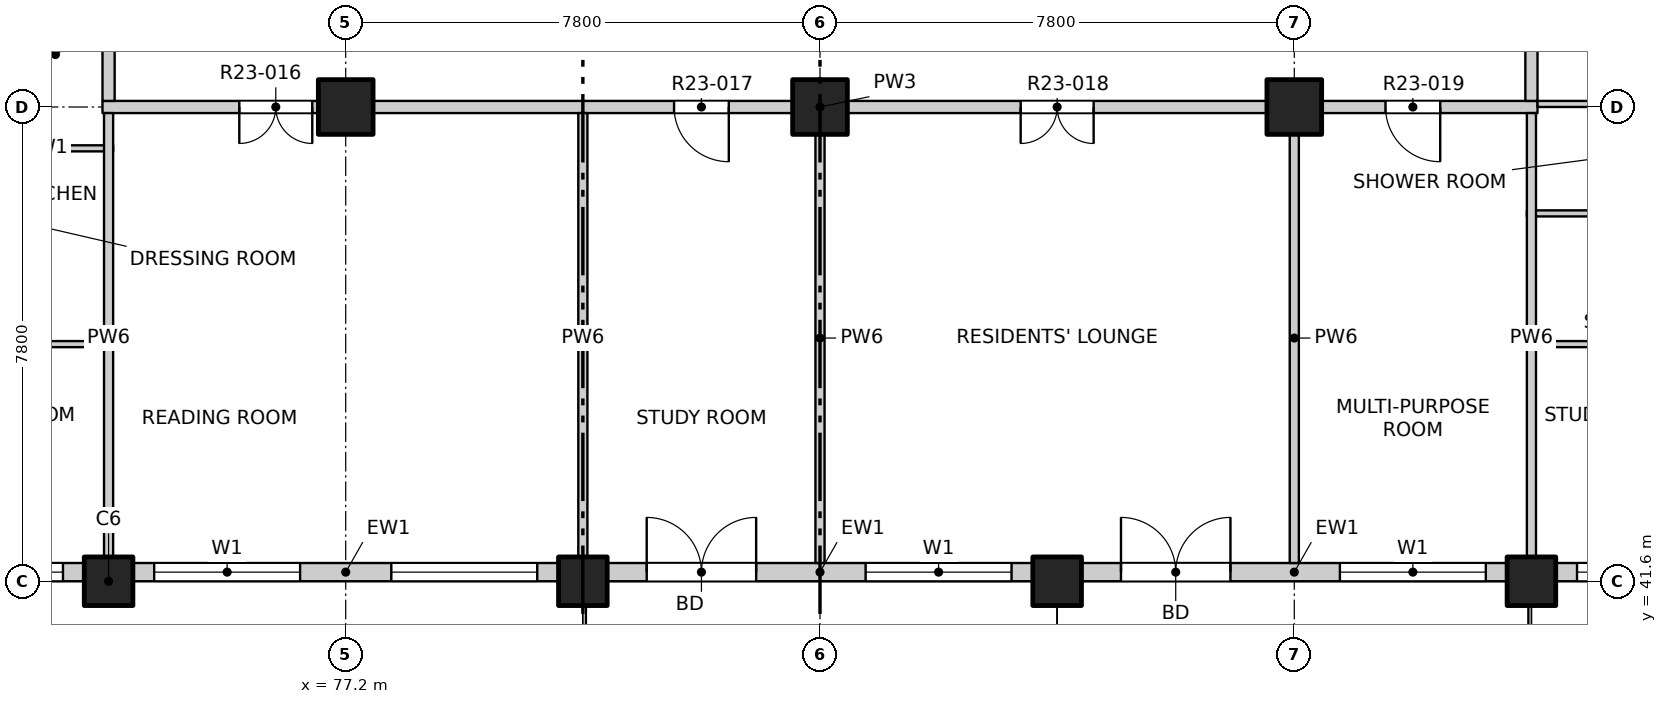
"""IFC4 building model, lengths in metres.
Left out: names, types, materials, properties, quantities, classifications, styles, units other than length and angle.
Written with IfcOpenShell. Run it as: python <this file> out.ifc"""

import sys

from ifc_helpers import new_model, si_unit, direction, frame, frame_2d, origin, origin_2d, place, context, subcontext, project, spatial, rectangle, extrude, element, fill, save


model = new_model("IFC4")
c1 = context("Model", 3, precision=1e-05, world=origin(), true_north=direction((0.0, 1.0)))
c2 = subcontext(c1, "Body", "Model", "MODEL_VIEW")
j1 = project(units=[si_unit("LENGTHUNIT", "METRE"), si_unit("PLANEANGLEUNIT", "RADIAN")], contexts=[c1])
p1 = place(None, origin())
s1 = spatial("IfcSite", under=j1, at=p1, CompositionType="ELEMENT")
p2 = place(p1, origin())
s2 = spatial("IfcBuilding", under=s1, at=p2, CompositionType="ELEMENT")
p3 = place(p2, frame((0.0, 0.0, 238.1)))
s3 = spatial("IfcBuildingStorey", under=s2, at=p3, CompositionType="ELEMENT", Elevation=238.1)
for number, where, z_axis, x_axis in (
    (1, (73.3, 41.6, -0.25), (0.0, 0.0, 1.0), (1.0, 0.0, 0.0)),
    (2, (81.1, 41.6, -0.25), (0.0, 0.0, 1.0), (1.0, 0.0, 0.0)),
    (3, (88.9, 41.6, -0.25), (0.0, 0.0, 1.0), (1.0, 0.0, 0.0)),
    (4, (96.7, 41.6, -0.25), (0.0, 0.0, 1.0), (1.0, 0.0, 0.0)),
):
    element("IfcColumn", number, at=place(p3, frame(where, z_axis=z_axis, x_axis=x_axis)), inside=s3, PredefinedType="COLUMN", context=c2, shape_type="SweptSolid", body=[
        extrude(rectangle(XDim=0.8, YDim=0.8, at=origin_2d()), origin(), (0.0, 0.0, 1.0), 3.35),
    ])
for number, where, z_axis, x_axis in (
    (5, (77.2, 49.4, -0.25), (0.0, 0.0, 1.0), (1.0, 0.0, 0.0)),
    (6, (85.0, 49.4, -0.25), (0.0, 0.0, 1.0), (1.0, 0.0, 0.0)),
    (7, (92.8, 49.4, -0.25), (0.0, 0.0, 1.0), (1.0, 0.0, 0.0)),
):
    element("IfcColumn", number, at=place(p3, frame(where, z_axis=z_axis, x_axis=x_axis)), inside=s3, PredefinedType="COLUMN", context=c2, shape_type="SweptSolid", body=[
        extrude(rectangle(XDim=0.9, YDim=0.9, at=origin_2d()), origin(), (0.0, 0.0, 1.0), 3.35),
    ])
p4 = place(p3, frame((65.5, 41.75, 0.0), z_axis=(0.0, 0.0, 1.0), x_axis=(1.0, 0.0, 0.0)))
e8 = element("IfcWall", 8, at=p4, inside=s3, PredefinedType="SOLIDWALL", context=c2, shape_type="SweptSolid", body=[
    extrude(rectangle(XDim=7.4, YDim=0.3, at=frame_2d((3.7, 0.0))), origin(), (0.0, 0.0, 1.0), 3.1),
])
p5 = place(p4, frame((0.75, 0.0, 0.9)))
e9 = element("IfcOpeningElement", 9, at=p5, cuts=e8, PredefinedType="OPENING", context=c2, shape_type="SweptSolid", body=[
    extrude(rectangle(XDim=2.4, YDim=1.8, at=frame_2d((1.2, 0.9))), frame((0.0, 0.16, 0.0), z_axis=(0.0, -1.0, 0.0), x_axis=(1.0, 0.0, 0.0)), (0.0, 0.0, 1.0), 0.32),
])
p6 = place(p4, frame((4.65, 0.0, 0.9)))
e10 = element("IfcOpeningElement", 10, at=p6, cuts=e8, PredefinedType="OPENING", context=c2, shape_type="SweptSolid", body=[
    extrude(rectangle(XDim=2.4, YDim=1.8, at=frame_2d((1.2, 0.9))), frame((0.0, 0.16, 0.0), z_axis=(0.0, -1.0, 0.0), x_axis=(1.0, 0.0, 0.0)), (0.0, 0.0, 1.0), 0.32),
])
p7 = place(p3, frame((73.7, 41.75, 0.0), z_axis=(0.0, 0.0, 1.0), x_axis=(1.0, 0.0, 0.0)))
e11 = element("IfcWall", 11, at=p7, inside=s3, PredefinedType="SOLIDWALL", context=c2, shape_type="SweptSolid", body=[
    extrude(rectangle(XDim=7.0, YDim=0.3, at=frame_2d((3.5, 0.0))), origin(), (0.0, 0.0, 1.0), 3.1),
])
p8 = place(p7, frame((0.35, 0.0, 0.9)))
e12 = element("IfcOpeningElement", 12, at=p8, cuts=e11, PredefinedType="OPENING", context=c2, shape_type="SweptSolid", body=[
    extrude(rectangle(XDim=2.4, YDim=1.8, at=frame_2d((1.2, 0.9))), frame((0.0, 0.16, 0.0), z_axis=(0.0, -1.0, 0.0), x_axis=(1.0, 0.0, 0.0)), (0.0, 0.0, 1.0), 0.32),
])
p9 = place(p7, frame((4.25, 0.0, 0.9)))
e13 = element("IfcOpeningElement", 13, at=p9, cuts=e11, PredefinedType="OPENING", context=c2, shape_type="SweptSolid", body=[
    extrude(rectangle(XDim=2.4, YDim=1.8, at=frame_2d((1.2, 0.9))), frame((0.0, 0.16, 0.0), z_axis=(0.0, -1.0, 0.0), x_axis=(1.0, 0.0, 0.0)), (0.0, 0.0, 1.0), 0.32),
])
p10 = place(p3, frame((81.5, 41.75, 0.0), z_axis=(0.0, 0.0, 1.0), x_axis=(1.0, 0.0, 0.0)))
e14 = element("IfcWall", 14, at=p10, inside=s3, PredefinedType="SOLIDWALL", context=c2, shape_type="SweptSolid", body=[
    extrude(rectangle(XDim=7.0, YDim=0.3, at=frame_2d((3.5, 0.0))), origin(), (0.0, 0.0, 1.0), 3.1),
])
p11 = place(p10, frame((0.65, 0.0, 0.0)))
e15 = element("IfcOpeningElement", 15, at=p11, cuts=e14, PredefinedType="OPENING", context=c2, shape_type="SweptSolid", body=[
    extrude(rectangle(XDim=1.8, YDim=2.4, at=frame_2d((0.9, 1.2))), frame((0.0, 0.16, 0.0), z_axis=(0.0, -1.0, 0.0), x_axis=(1.0, 0.0, 0.0)), (0.0, 0.0, 1.0), 0.32),
])
p12 = place(p10, frame((4.25, 0.0, 0.9)))
e16 = element("IfcOpeningElement", 16, at=p12, cuts=e14, PredefinedType="OPENING", context=c2, shape_type="SweptSolid", body=[
    extrude(rectangle(XDim=2.4, YDim=1.8, at=frame_2d((1.2, 0.9))), frame((0.0, 0.16, 0.0), z_axis=(0.0, -1.0, 0.0), x_axis=(1.0, 0.0, 0.0)), (0.0, 0.0, 1.0), 0.32),
])
p13 = place(p3, frame((89.3, 41.75, 0.0), z_axis=(0.0, 0.0, 1.0), x_axis=(1.0, 0.0, 0.0)))
e17 = element("IfcWall", 17, at=p13, inside=s3, PredefinedType="SOLIDWALL", context=c2, shape_type="SweptSolid", body=[
    extrude(rectangle(XDim=7.0, YDim=0.3, at=frame_2d((3.5, 0.0))), origin(), (0.0, 0.0, 1.0), 3.1),
])
p14 = place(p13, frame((0.65, 0.0, 0.0)))
e18 = element("IfcOpeningElement", 18, at=p14, cuts=e17, PredefinedType="OPENING", context=c2, shape_type="SweptSolid", body=[
    extrude(rectangle(XDim=1.8, YDim=2.4, at=frame_2d((0.9, 1.2))), frame((0.0, 0.16, 0.0), z_axis=(0.0, -1.0, 0.0), x_axis=(1.0, 0.0, 0.0)), (0.0, 0.0, 1.0), 0.32),
])
p15 = place(p13, frame((4.25, 0.0, 0.9)))
e19 = element("IfcOpeningElement", 19, at=p15, cuts=e17, PredefinedType="OPENING", context=c2, shape_type="SweptSolid", body=[
    extrude(rectangle(XDim=2.4, YDim=1.8, at=frame_2d((1.2, 0.9))), frame((0.0, 0.16, 0.0), z_axis=(0.0, -1.0, 0.0), x_axis=(1.0, 0.0, 0.0)), (0.0, 0.0, 1.0), 0.32),
])
p16 = place(p3, frame((97.1, 41.75, 0.0), z_axis=(0.0, 0.0, 1.0), x_axis=(1.0, 0.0, 0.0)))
e20 = element("IfcWall", 20, at=p16, inside=s3, PredefinedType="SOLIDWALL", context=c2, shape_type="SweptSolid", body=[
    extrude(rectangle(XDim=7.4, YDim=0.3, at=frame_2d((3.7, 0.0))), origin(), (0.0, 0.0, 1.0), 3.1),
])
p17 = place(p16, frame((0.35, 0.0, 0.9)))
e21 = element("IfcOpeningElement", 21, at=p17, cuts=e20, PredefinedType="OPENING", context=c2, shape_type="SweptSolid", body=[
    extrude(rectangle(XDim=2.4, YDim=1.8, at=frame_2d((1.2, 0.9))), frame((0.0, 0.16, 0.0), z_axis=(0.0, -1.0, 0.0), x_axis=(1.0, 0.0, 0.0)), (0.0, 0.0, 1.0), 0.32),
])
p18 = place(p16, frame((4.25, 0.0, 0.9)))
e22 = element("IfcOpeningElement", 22, at=p18, cuts=e20, PredefinedType="OPENING", context=c2, shape_type="SweptSolid", body=[
    extrude(rectangle(XDim=2.4, YDim=1.8, at=frame_2d((1.2, 0.9))), frame((0.0, 0.16, 0.0), z_axis=(0.0, -1.0, 0.0), x_axis=(1.0, 0.0, 0.0)), (0.0, 0.0, 1.0), 0.32),
])
p19 = place(p3, frame((61.9, 45.5, 0.0), z_axis=(0.0, 0.0, 1.0), x_axis=(1.0, 0.0, 0.0)))
e23 = element("IfcWall", 23, at=p19, inside=s3, PredefinedType="PARTITIONING", context=c2, shape_type="SweptSolid", body=[
    extrude(rectangle(XDim=11.475, YDim=0.1, at=frame_2d((5.737, 0.0))), origin(), (0.0, 0.0, 1.0), 3.1),
])
p20 = place(p19, frame((7.965, 0.0, 0.0)))
e24 = element("IfcOpeningElement", 24, at=p20, cuts=e23, PredefinedType="OPENING", context=c2, shape_type="SweptSolid", body=[
    extrude(rectangle(XDim=0.9, YDim=2.1, at=frame_2d((0.45, 1.05))), frame((0.0, 0.06, 0.0), z_axis=(0.0, -1.0, 0.0), x_axis=(1.0, 0.0, 0.0)), (0.0, 0.0, 1.0), 0.12),
])
p21 = place(p3, frame((96.625, 45.5, 0.0), z_axis=(0.0, 0.0, 1.0), x_axis=(1.0, 0.0, 0.0)))
e25 = element("IfcWall", 25, at=p21, inside=s3, PredefinedType="PARTITIONING", context=c2, shape_type="SweptSolid", body=[
    extrude(rectangle(XDim=11.475, YDim=0.1, at=frame_2d((5.738, 0.0))), origin(), (0.0, 0.0, 1.0), 3.1),
])
p22 = place(p21, frame((2.61, 0.0, 0.0)))
e26 = element("IfcOpeningElement", 26, at=p22, cuts=e25, PredefinedType="OPENING", context=c2, shape_type="SweptSolid", body=[
    extrude(rectangle(XDim=0.9, YDim=2.1, at=frame_2d((0.45, 1.05))), frame((0.0, 0.06, 0.0), z_axis=(0.0, -1.0, 0.0), x_axis=(1.0, 0.0, 0.0)), (0.0, 0.0, 1.0), 0.12),
])
p23 = place(p3, frame((96.625, 47.65, 0.0), z_axis=(0.0, 0.0, 1.0), x_axis=(1.0, 0.0, 0.0)))
e27 = element("IfcWall", 27, at=p23, inside=s3, PredefinedType="PARTITIONING", context=c2, shape_type="SweptSolid", body=[
    extrude(rectangle(XDim=2.195, YDim=0.1, at=frame_2d((1.098, 0.0))), origin(), (0.0, 0.0, 1.0), 3.1),
])
p24 = place(p3, frame((71.18, 48.72, 0.0), z_axis=(0.0, 0.0, 1.0), x_axis=(1.0, 0.0, 0.0)))
e28 = element("IfcWall", 28, at=p24, inside=s3, PredefinedType="PARTITIONING", context=c2, shape_type="SweptSolid", body=[
    extrude(rectangle(XDim=2.195, YDim=0.1, at=frame_2d((1.097, 0.0))), origin(), (0.0, 0.0, 1.0), 3.1),
])
p25 = place(p3, frame((73.2, 49.4, 0.0), z_axis=(0.0, 0.0, 1.0), x_axis=(1.0, 0.0, 0.0)))
e29 = element("IfcWall", 29, at=p25, inside=s3, PredefinedType="PARTITIONING", context=c2, shape_type="SweptSolid", body=[
    extrude(rectangle(XDim=23.6, YDim=0.2, at=frame_2d((11.8, 0.0))), origin(), (0.0, 0.0, 1.0), 3.1),
])
p26 = place(p25, frame((2.25, 0.0, 0.0)))
e30 = element("IfcOpeningElement", 30, at=p26, cuts=e29, PredefinedType="OPENING", context=c2, shape_type="SweptSolid", body=[
    extrude(rectangle(XDim=1.2, YDim=2.1, at=frame_2d((0.6, 1.05))), frame((0.0, 0.11, 0.0), z_axis=(0.0, -1.0, 0.0), x_axis=(1.0, 0.0, 0.0)), (0.0, 0.0, 1.0), 0.22),
])
p27 = place(p25, frame((9.4, 0.0, 0.0)))
e31 = element("IfcOpeningElement", 31, at=p27, cuts=e29, PredefinedType="OPENING", context=c2, shape_type="SweptSolid", body=[
    extrude(rectangle(XDim=0.9, YDim=2.1, at=frame_2d((0.45, 1.05))), frame((0.0, 0.11, 0.0), z_axis=(0.0, -1.0, 0.0), x_axis=(1.0, 0.0, 0.0)), (0.0, 0.0, 1.0), 0.22),
])
p28 = place(p25, frame((15.1, 0.0, 0.0)))
e32 = element("IfcOpeningElement", 32, at=p28, cuts=e29, PredefinedType="OPENING", context=c2, shape_type="SweptSolid", body=[
    extrude(rectangle(XDim=1.2, YDim=2.1, at=frame_2d((0.6, 1.05))), frame((0.0, 0.11, 0.0), z_axis=(0.0, -1.0, 0.0), x_axis=(1.0, 0.0, 0.0)), (0.0, 0.0, 1.0), 0.22),
])
p29 = place(p25, frame((21.1, 0.0, 0.0)))
e33 = element("IfcOpeningElement", 33, at=p29, cuts=e29, PredefinedType="OPENING", context=c2, shape_type="SweptSolid", body=[
    extrude(rectangle(XDim=0.9, YDim=2.1, at=frame_2d((0.45, 1.05))), frame((0.0, 0.11, 0.0), z_axis=(0.0, -1.0, 0.0), x_axis=(1.0, 0.0, 0.0)), (0.0, 0.0, 1.0), 0.22),
])
p30 = place(p3, frame((96.8, 49.45, 0.0), z_axis=(0.0, 0.0, 1.0), x_axis=(1.0, 0.0, 0.0)))
e34 = element("IfcWall", 34, at=p30, inside=s3, PredefinedType="PARTITIONING", context=c2, shape_type="SweptSolid", body=[
    extrude(rectangle(XDim=2.02, YDim=0.1, at=frame_2d((1.01, 0.0))), origin(), (0.0, 0.0, 1.0), 3.1),
])
p31 = place(p3, frame((73.3, 41.9, 0.0), z_axis=(0.0, 0.0, 1.0), x_axis=(0.0, 1.0, 0.0)))
e35 = element("IfcWall", 35, at=p31, inside=s3, PredefinedType="PARTITIONING", context=c2, shape_type="SweptSolid", body=[
    extrude(rectangle(XDim=7.4, YDim=0.15, at=frame_2d((3.7, 0.0))), origin(), (0.0, 0.0, 1.0), 3.1),
])
p32 = place(p3, frame((73.3, 49.5, 0.0), z_axis=(0.0, 0.0, 1.0), x_axis=(0.0, 1.0, 0.0)))
e36 = element("IfcWall", 36, at=p32, inside=s3, PredefinedType="PARTITIONING", context=c2, shape_type="SweptSolid", body=[
    extrude(rectangle(XDim=34.9, YDim=0.2, at=frame_2d((17.45, 0.0))), origin(), (0.0, 0.0, 1.0), 3.1),
])
p33 = place(p32, frame((3.075, 0.0, 0.0)))
e37 = element("IfcOpeningElement", 37, at=p33, cuts=e36, PredefinedType="OPENING", context=c2, shape_type="SweptSolid", body=[
    extrude(rectangle(XDim=1.0, YDim=2.1, at=frame_2d((0.5, 1.05))), frame((0.0, 0.11, 0.0), z_axis=(0.0, -1.0, 0.0), x_axis=(1.0, 0.0, 0.0)), (0.0, 0.0, 1.0), 0.22),
])
p34 = place(p32, frame((14.575, 0.0, 0.0)))
e38 = element("IfcOpeningElement", 38, at=p34, cuts=e36, PredefinedType="OPENING", context=c2, shape_type="SweptSolid", body=[
    extrude(rectangle(XDim=1.0, YDim=2.1, at=frame_2d((0.5, 1.05))), frame((0.0, 0.11, 0.0), z_axis=(0.0, -1.0, 0.0), x_axis=(1.0, 0.0, 0.0)), (0.0, 0.0, 1.0), 0.22),
])
p35 = place(p32, frame((33.625, 0.0, 0.0)))
e39 = element("IfcOpeningElement", 39, at=p35, cuts=e36, PredefinedType="OPENING", context=c2, shape_type="SweptSolid", body=[
    extrude(rectangle(XDim=1.0, YDim=2.1, at=frame_2d((0.5, 1.05))), frame((0.0, 0.11, 0.0), z_axis=(0.0, -1.0, 0.0), x_axis=(1.0, 0.0, 0.0)), (0.0, 0.0, 1.0), 0.22),
])
for number, where, z_axis, x_axis in (
    (40, (81.1, 41.9, 0.0), (0.0, 0.0, 1.0), (0.0, 1.0, 0.0)),
    (41, (85.0, 41.9, 0.0), (0.0, 0.0, 1.0), (0.0, 1.0, 0.0)),
    (42, (92.8, 41.9, 0.0), (0.0, 0.0, 1.0), (0.0, 1.0, 0.0)),
    (43, (96.7, 41.9, 0.0), (0.0, 0.0, 1.0), (0.0, 1.0, 0.0)),
):
    element("IfcWall", number, at=place(p3, frame(where, z_axis=z_axis, x_axis=x_axis)), inside=s3, PredefinedType="PARTITIONING", context=c2, shape_type="SweptSolid", body=[
        extrude(rectangle(XDim=7.4, YDim=0.15, at=frame_2d((3.7, 0.0))), origin(), (0.0, 0.0, 1.0), 3.1),
    ])
p36 = place(p3, frame((96.7, 49.5, 0.0), z_axis=(0.0, 0.0, 1.0), x_axis=(0.0, 1.0, 0.0)))
e44 = element("IfcWall", 44, at=p36, inside=s3, PredefinedType="PARTITIONING", context=c2, shape_type="SweptSolid", body=[
    extrude(rectangle(XDim=34.9, YDim=0.2, at=frame_2d((17.45, 0.0))), origin(), (0.0, 0.0, 1.0), 3.1),
])
p37 = place(p36, frame((3.175, 0.0, 0.0)))
e45 = element("IfcOpeningElement", 45, at=p37, cuts=e44, PredefinedType="OPENING", context=c2, shape_type="SweptSolid", body=[
    extrude(rectangle(XDim=1.0, YDim=2.1, at=frame_2d((0.5, 1.05))), frame((0.0, 0.11, 0.0), z_axis=(0.0, -1.0, 0.0), x_axis=(1.0, 0.0, 0.0)), (0.0, 0.0, 1.0), 0.22),
])
p38 = place(p36, frame((14.625, 0.0, 0.0)))
e46 = element("IfcOpeningElement", 46, at=p38, cuts=e44, PredefinedType="OPENING", context=c2, shape_type="SweptSolid", body=[
    extrude(rectangle(XDim=1.0, YDim=2.1, at=frame_2d((0.5, 1.05))), frame((0.0, 0.11, 0.0), z_axis=(0.0, -1.0, 0.0), x_axis=(1.0, 0.0, 0.0)), (0.0, 0.0, 1.0), 0.22),
])
p39 = place(p36, frame((30.175, 0.0, 0.0)))
e47 = element("IfcOpeningElement", 47, at=p39, cuts=e44, PredefinedType="OPENING", context=c2, shape_type="SweptSolid", body=[
    extrude(rectangle(XDim=1.0, YDim=2.1, at=frame_2d((0.5, 1.05))), frame((0.0, 0.11, 0.0), z_axis=(0.0, -1.0, 0.0), x_axis=(1.0, 0.0, 0.0)), (0.0, 0.0, 1.0), 0.22),
])
p40 = place(p6, origin())
e48 = element("IfcWindow", 48, at=p40, inside=s3, PartitioningType="DOUBLE_PANEL_VERTICAL", PredefinedType="WINDOW", context=c2, shape_type="SweptSolid", body=[
    extrude(rectangle(XDim=2.4, YDim=1.8, at=frame_2d((1.2, 0.9))), frame((0.0, 0.03, 0.0), z_axis=(0.0, -1.0, 0.0), x_axis=(1.0, 0.0, 0.0)), (0.0, 0.0, 1.0), 0.06),
])
fill(e10, e48)
p41 = place(p8, origin())
e49 = element("IfcWindow", 49, at=p41, inside=s3, PartitioningType="DOUBLE_PANEL_VERTICAL", PredefinedType="WINDOW", context=c2, shape_type="SweptSolid", body=[
    extrude(rectangle(XDim=2.4, YDim=1.8, at=frame_2d((1.2, 0.9))), frame((0.0, 0.03, 0.0), z_axis=(0.0, -1.0, 0.0), x_axis=(1.0, 0.0, 0.0)), (0.0, 0.0, 1.0), 0.06),
])
fill(e12, e49)
p42 = place(p9, origin())
e50 = element("IfcWindow", 50, at=p42, inside=s3, PartitioningType="DOUBLE_PANEL_VERTICAL", PredefinedType="WINDOW", context=c2, shape_type="SweptSolid", body=[
    extrude(rectangle(XDim=2.4, YDim=1.8, at=frame_2d((1.2, 0.9))), frame((0.0, 0.03, 0.0), z_axis=(0.0, -1.0, 0.0), x_axis=(1.0, 0.0, 0.0)), (0.0, 0.0, 1.0), 0.06),
])
fill(e13, e50)
p43 = place(p11, origin())
e51 = element("IfcDoor", 51, at=p43, inside=s3, OperationType="DOUBLE_DOOR_SINGLE_SWING", PredefinedType="DOOR", context=c2, shape_type="SweptSolid", body=[
    extrude(rectangle(XDim=1.8, YDim=2.4, at=frame_2d((0.9, 1.2))), frame((0.0, 0.025, 0.0), z_axis=(0.0, -1.0, 0.0), x_axis=(1.0, 0.0, 0.0)), (0.0, 0.0, 1.0), 0.05),
])
fill(e15, e51)
p44 = place(p12, origin())
e52 = element("IfcWindow", 52, at=p44, inside=s3, PartitioningType="DOUBLE_PANEL_VERTICAL", PredefinedType="WINDOW", context=c2, shape_type="SweptSolid", body=[
    extrude(rectangle(XDim=2.4, YDim=1.8, at=frame_2d((1.2, 0.9))), frame((0.0, 0.03, 0.0), z_axis=(0.0, -1.0, 0.0), x_axis=(1.0, 0.0, 0.0)), (0.0, 0.0, 1.0), 0.06),
])
fill(e16, e52)
p45 = place(p14, origin())
e53 = element("IfcDoor", 53, at=p45, inside=s3, OperationType="DOUBLE_DOOR_SINGLE_SWING", PredefinedType="DOOR", context=c2, shape_type="SweptSolid", body=[
    extrude(rectangle(XDim=1.8, YDim=2.4, at=frame_2d((0.9, 1.2))), frame((0.0, 0.025, 0.0), z_axis=(0.0, -1.0, 0.0), x_axis=(1.0, 0.0, 0.0)), (0.0, 0.0, 1.0), 0.05),
])
fill(e18, e53)
p46 = place(p15, origin())
e54 = element("IfcWindow", 54, at=p46, inside=s3, PartitioningType="DOUBLE_PANEL_VERTICAL", PredefinedType="WINDOW", context=c2, shape_type="SweptSolid", body=[
    extrude(rectangle(XDim=2.4, YDim=1.8, at=frame_2d((1.2, 0.9))), frame((0.0, 0.03, 0.0), z_axis=(0.0, -1.0, 0.0), x_axis=(1.0, 0.0, 0.0)), (0.0, 0.0, 1.0), 0.06),
])
fill(e19, e54)
p47 = place(p17, origin())
e55 = element("IfcWindow", 55, at=p47, inside=s3, PartitioningType="DOUBLE_PANEL_VERTICAL", PredefinedType="WINDOW", context=c2, shape_type="SweptSolid", body=[
    extrude(rectangle(XDim=2.4, YDim=1.8, at=frame_2d((1.2, 0.9))), frame((0.0, 0.03, 0.0), z_axis=(0.0, -1.0, 0.0), x_axis=(1.0, 0.0, 0.0)), (0.0, 0.0, 1.0), 0.06),
])
fill(e21, e55)
p48 = place(p26, origin())
e56 = element("IfcDoor", 56, at=p48, inside=s3, OperationType="DOUBLE_DOOR_SINGLE_SWING", PredefinedType="DOOR", context=c2, shape_type="SweptSolid", body=[
    extrude(rectangle(XDim=1.2, YDim=2.1, at=frame_2d((0.6, 1.05))), frame((0.0, 0.025, 0.0), z_axis=(0.0, -1.0, 0.0), x_axis=(1.0, 0.0, 0.0)), (0.0, 0.0, 1.0), 0.05),
])
fill(e30, e56)
p49 = place(p27, origin())
e57 = element("IfcDoor", 57, at=p49, inside=s3, OperationType="SINGLE_SWING_LEFT", PredefinedType="DOOR", context=c2, shape_type="SweptSolid", body=[
    extrude(rectangle(XDim=0.9, YDim=2.1, at=frame_2d((0.45, 1.05))), frame((0.0, 0.025, 0.0), z_axis=(0.0, -1.0, 0.0), x_axis=(1.0, 0.0, 0.0)), (0.0, 0.0, 1.0), 0.05),
])
fill(e31, e57)
p50 = place(p28, origin())
e58 = element("IfcDoor", 58, at=p50, inside=s3, OperationType="DOUBLE_DOOR_SINGLE_SWING", PredefinedType="DOOR", context=c2, shape_type="SweptSolid", body=[
    extrude(rectangle(XDim=1.2, YDim=2.1, at=frame_2d((0.6, 1.05))), frame((0.0, 0.025, 0.0), z_axis=(0.0, -1.0, 0.0), x_axis=(1.0, 0.0, 0.0)), (0.0, 0.0, 1.0), 0.05),
])
fill(e32, e58)
p51 = place(p29, origin())
e59 = element("IfcDoor", 59, at=p51, inside=s3, OperationType="SINGLE_SWING_LEFT", PredefinedType="DOOR", context=c2, shape_type="SweptSolid", body=[
    extrude(rectangle(XDim=0.9, YDim=2.1, at=frame_2d((0.45, 1.05))), frame((0.0, 0.025, 0.0), z_axis=(0.0, -1.0, 0.0), x_axis=(1.0, 0.0, 0.0)), (0.0, 0.0, 1.0), 0.05),
])
fill(e33, e59)
save(model, sys.argv[1])
